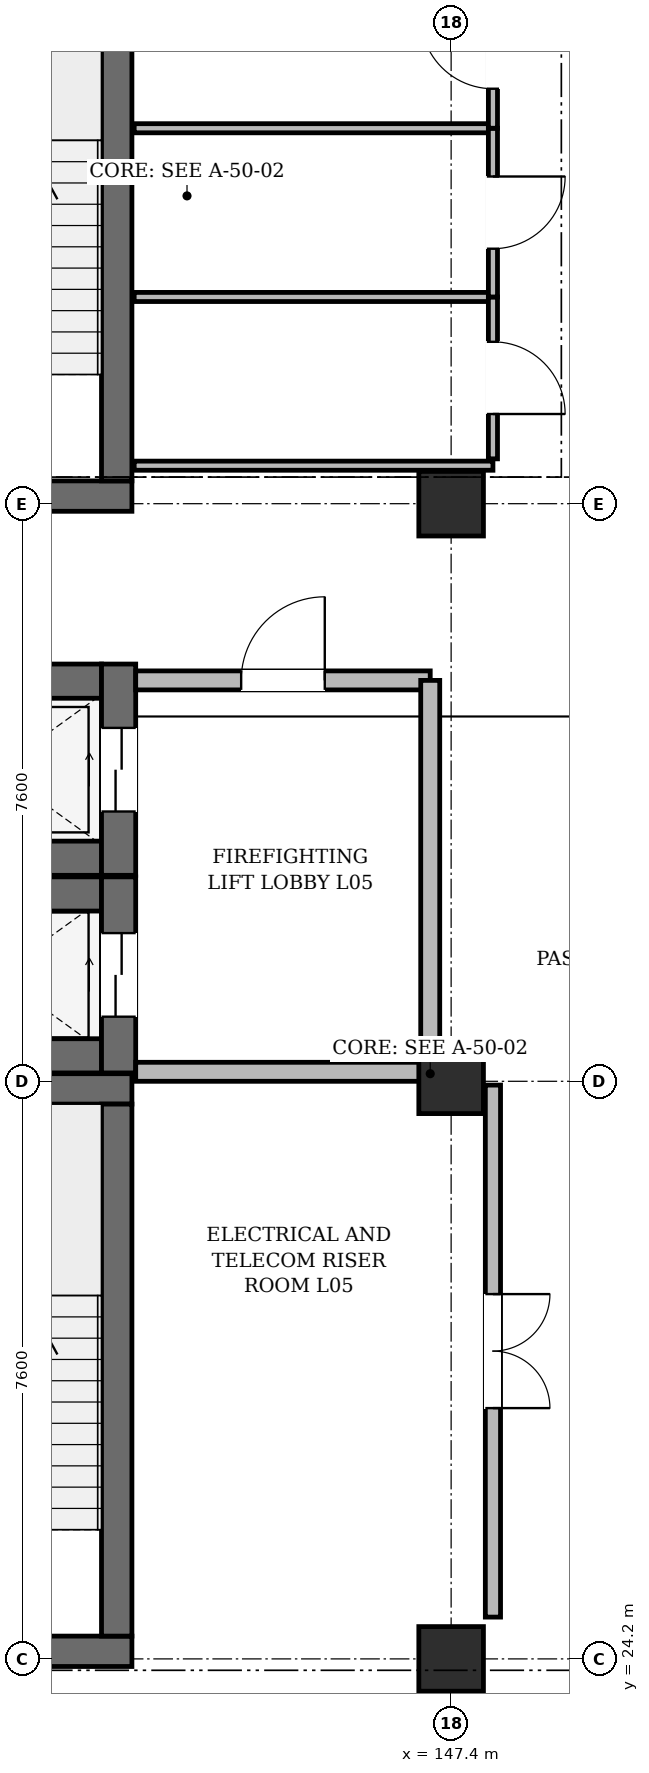
"""IFC4 building model, lengths in metres.
Left out: names, types, materials, properties, quantities, classifications, styles, units other than length and angle.
Written with IfcOpenShell. Run it as: python <this file> out.ifc"""

import sys

from ifc_helpers import new_model, si_unit, direction, frame, frame_2d, origin, origin_2d, place, context, subcontext, project, spatial, rectangle, extrude, element, fill, save


model = new_model("IFC4")
c1 = context("Model", 3, precision=1e-05, world=origin(), true_north=direction((0.0, 1.0)))
c2 = subcontext(c1, "Body", "Model", "MODEL_VIEW")
j1 = project(units=[si_unit("LENGTHUNIT", "METRE"), si_unit("PLANEANGLEUNIT", "RADIAN")], contexts=[c1])
p1 = place(None, origin())
s1 = spatial("IfcSite", under=j1, at=p1, CompositionType="ELEMENT")
p2 = place(p1, origin())
s2 = spatial("IfcBuilding", under=s1, at=p2, CompositionType="ELEMENT")
p3 = place(p2, frame((0.0, 0.0, 24.0)))
s3 = spatial("IfcBuildingStorey", under=s2, at=p3, CompositionType="ELEMENT", Elevation=24.0)
for number, where, z_axis, x_axis in (
    (1, (147.4, 24.2, 0.0), (0.0, 0.0, 1.0), (1.0, 0.0, 0.0)),
    (2, (147.4, 31.8, 0.0), (0.0, 0.0, 1.0), (1.0, 0.0, 0.0)),
    (3, (147.4, 39.4, 0.0), (0.0, 0.0, 1.0), (1.0, 0.0, 0.0)),
):
    element("IfcColumn", number, at=place(p3, frame(where, z_axis=z_axis, x_axis=x_axis)), inside=s3, PredefinedType="COLUMN", context=c2, shape_type="SweptSolid", body=[
        extrude(rectangle(XDim=0.85, YDim=0.85, at=origin_2d()), origin(), (0.0, 0.0, 1.0), 3.93),
    ])
p4 = place(p3, frame((139.4, 24.3, 0.0), z_axis=(0.0, 0.0, 1.0), x_axis=(1.0, 0.0, 0.0)))
e4 = element("IfcWall", 4, at=p4, inside=s3, PredefinedType="SHEAR", context=c2, shape_type="SweptSolid", body=[
    extrude(rectangle(XDim=3.8, YDim=0.4, at=frame_2d((1.9, 0.0))), origin(), (0.0, 0.0, 1.0), 3.93),
])
p5 = place(p4, frame((1.3, 0.0, 0.0)))
e5 = element("IfcOpeningElement", 5, at=p5, cuts=e4, PredefinedType="OPENING", context=c2, shape_type="SweptSolid", body=[
    extrude(rectangle(XDim=1.2, YDim=2.2, at=frame_2d((0.6, 1.1))), frame((0.0, 0.212, 0.0), z_axis=(0.0, -1.0, 0.0), x_axis=(1.0, 0.0, 0.0)), (0.0, 0.0, 1.0), 0.424),
])
p6 = place(p3, frame((139.4, 31.7, 0.0), z_axis=(0.0, 0.0, 1.0), x_axis=(1.0, 0.0, 0.0)))
e6 = element("IfcWall", 6, at=p6, inside=s3, PredefinedType="SHEAR", context=c2, shape_type="SweptSolid", body=[
    extrude(rectangle(XDim=3.8, YDim=0.4, at=frame_2d((1.9, 0.0))), origin(), (0.0, 0.0, 1.0), 3.93),
])
p7 = place(p3, frame((143.0, 24.5, 0.0), z_axis=(0.0, 0.0, 1.0), x_axis=(0.0, 1.0, 0.0)))
e7 = element("IfcWall", 7, at=p7, inside=s3, PredefinedType="SHEAR", context=c2, shape_type="SweptSolid", body=[
    extrude(rectangle(XDim=7.0, YDim=0.4, at=frame_2d((3.5, 0.0))), origin(), (0.0, 0.0, 1.0), 3.93),
])
p8 = place(p3, frame((139.4, 39.5, 0.0), z_axis=(0.0, 0.0, 1.0), x_axis=(1.0, 0.0, 0.0)))
e8 = element("IfcWall", 8, at=p8, inside=s3, PredefinedType="SHEAR", context=c2, shape_type="SweptSolid", body=[
    extrude(rectangle(XDim=3.8, YDim=0.4, at=frame_2d((1.9, 0.0))), origin(), (0.0, 0.0, 1.0), 3.93),
])
p9 = place(p8, frame((1.3, 0.0, 0.0)))
e9 = element("IfcOpeningElement", 9, at=p9, cuts=e8, PredefinedType="OPENING", context=c2, shape_type="SweptSolid", body=[
    extrude(rectangle(XDim=1.2, YDim=2.2, at=frame_2d((0.6, 1.1))), frame((0.0, 0.212, 0.0), z_axis=(0.0, -1.0, 0.0), x_axis=(1.0, 0.0, 0.0)), (0.0, 0.0, 1.0), 0.424),
])
p10 = place(p3, frame((143.0, 39.7, 0.0), z_axis=(0.0, 0.0, 1.0), x_axis=(0.0, 1.0, 0.0)))
e10 = element("IfcWall", 10, at=p10, inside=s3, PredefinedType="SHEAR", context=c2, shape_type="SweptSolid", body=[
    extrude(rectangle(XDim=7.0, YDim=0.4, at=frame_2d((3.5, 0.0))), origin(), (0.0, 0.0, 1.0), 3.93),
])
for number, where, z_axis, x_axis in (
    (11, (140.06, 32.135, 0.0), (0.0, 0.0, 1.0), (1.0, 0.0, 0.0)),
    (12, (140.06, 34.265, 0.0), (0.0, 0.0, 1.0), (1.0, 0.0, 0.0)),
):
    element("IfcWall", number, at=place(p3, frame(where, z_axis=z_axis, x_axis=x_axis)), inside=s3, PredefinedType="SHEAR", context=c2, shape_type="SweptSolid", body=[
        extrude(rectangle(XDim=2.74, YDim=0.45, at=frame_2d((1.37, 0.0))), origin(), (0.0, 0.0, 1.0), 3.93),
    ])
p11 = place(p3, frame((143.025, 31.91, 0.0), z_axis=(0.0, 0.0, 1.0), x_axis=(0.0, 1.0, 0.0)))
e13 = element("IfcWall", 13, at=p11, inside=s3, PredefinedType="SHEAR", context=c2, shape_type="SweptSolid", body=[
    extrude(rectangle(XDim=2.58, YDim=0.45, at=frame_2d((1.29, 0.0))), origin(), (0.0, 0.0, 1.0), 3.93),
])
p12 = place(p11, frame((0.74, 0.0, 0.0)))
e14 = element("IfcOpeningElement", 14, at=p12, cuts=e13, PredefinedType="OPENING", context=c2, shape_type="SweptSolid", body=[
    extrude(rectangle(XDim=1.1, YDim=2.2, at=frame_2d((0.55, 1.1))), frame((0.0, 0.237, 0.0), z_axis=(0.0, -1.0, 0.0), x_axis=(1.0, 0.0, 0.0)), (0.0, 0.0, 1.0), 0.474),
])
for number, where, z_axis, x_axis in (
    (15, (140.06, 34.735, 0.0), (0.0, 0.0, 1.0), (1.0, 0.0, 0.0)),
    (16, (140.06, 37.065, 0.0), (0.0, 0.0, 1.0), (1.0, 0.0, 0.0)),
):
    element("IfcWall", number, at=place(p3, frame(where, z_axis=z_axis, x_axis=x_axis)), inside=s3, PredefinedType="SHEAR", context=c2, shape_type="SweptSolid", body=[
        extrude(rectangle(XDim=2.74, YDim=0.45, at=frame_2d((1.37, 0.0))), origin(), (0.0, 0.0, 1.0), 3.93),
    ])
p13 = place(p3, frame((143.025, 34.51, 0.0), z_axis=(0.0, 0.0, 1.0), x_axis=(0.0, 1.0, 0.0)))
e17 = element("IfcWall", 17, at=p13, inside=s3, PredefinedType="SHEAR", context=c2, shape_type="SweptSolid", body=[
    extrude(rectangle(XDim=2.78, YDim=0.45, at=frame_2d((1.39, 0.0))), origin(), (0.0, 0.0, 1.0), 3.93),
])
p14 = place(p13, frame((0.84, 0.0, 0.0)))
e18 = element("IfcOpeningElement", 18, at=p14, cuts=e17, PredefinedType="OPENING", context=c2, shape_type="SweptSolid", body=[
    extrude(rectangle(XDim=1.1, YDim=2.2, at=frame_2d((0.55, 1.1))), frame((0.0, 0.237, 0.0), z_axis=(0.0, -1.0, 0.0), x_axis=(1.0, 0.0, 0.0)), (0.0, 0.0, 1.0), 0.474),
])
p15 = place(p3, frame((143.25, 37.075, 0.0), z_axis=(0.0, 0.0, 1.0), x_axis=(1.0, 0.0, 0.0)))
e19 = element("IfcWall", 19, at=p15, inside=s3, PredefinedType="SOLIDWALL", context=c2, shape_type="SweptSolid", body=[
    extrude(rectangle(XDim=3.875, YDim=0.25, at=frame_2d((1.938, 0.0))), origin(), (0.0, 0.0, 1.0), 3.805),
])
p16 = place(p15, frame((1.387, 0.0, 0.0)))
e20 = element("IfcOpeningElement", 20, at=p16, cuts=e19, PredefinedType="OPENING", context=c2, shape_type="SweptSolid", body=[
    extrude(rectangle(XDim=1.1, YDim=2.2, at=frame_2d((0.55, 1.1))), frame((0.0, 0.137, 0.0), z_axis=(0.0, -1.0, 0.0), x_axis=(1.0, 0.0, 0.0)), (0.0, 0.0, 1.0), 0.274),
])
p17 = place(p3, frame((143.25, 31.925, 0.0), z_axis=(0.0, 0.0, 1.0), x_axis=(1.0, 0.0, 0.0)))
e21 = element("IfcWall", 21, at=p17, inside=s3, PredefinedType="SOLIDWALL", context=c2, shape_type="SweptSolid", body=[
    extrude(rectangle(XDim=3.875, YDim=0.25, at=frame_2d((1.938, 0.0))), origin(), (0.0, 0.0, 1.0), 3.265),
])
p18 = place(p3, frame((147.125, 31.925, 0.0), z_axis=(0.0, 0.0, 1.0), x_axis=(0.0, 1.0, 0.0)))
e22 = element("IfcWall", 22, at=p18, inside=s3, PredefinedType="SOLIDWALL", context=c2, shape_type="SweptSolid", body=[
    extrude(rectangle(XDim=5.15, YDim=0.25, at=frame_2d((2.575, 0.0))), origin(), (0.0, 0.0, 1.0), 3.265),
])
p19 = place(p3, frame((143.23, 39.9, 0.0), z_axis=(0.0, 0.0, 1.0), x_axis=(1.0, 0.0, 0.0)))
e23 = element("IfcWall", 23, at=p19, inside=s3, PredefinedType="PARTITIONING", context=c2, shape_type="SweptSolid", body=[
    extrude(rectangle(XDim=4.72, YDim=0.12, at=frame_2d((2.36, 0.0))), origin(), (0.0, 0.0, 1.0), 3.805),
])
p20 = place(p3, frame((147.95, 31.75, 0.0), z_axis=(0.0, 0.0, 1.0), x_axis=(0.0, -1.0, 0.0)))
e24 = element("IfcWall", 24, at=p20, inside=s3, PredefinedType="PARTITIONING", context=c2, shape_type="SweptSolid", body=[
    extrude(rectangle(XDim=7.0, YDim=0.2, at=frame_2d((3.5, 0.0))), origin(), (0.0, 0.0, 1.0), 3.805),
])
p21 = place(p20, frame((2.75, 0.0, 0.0)))
e25 = element("IfcOpeningElement", 25, at=p21, cuts=e24, PredefinedType="OPENING", context=c2, shape_type="SweptSolid", body=[
    extrude(rectangle(XDim=1.5, YDim=2.2, at=frame_2d((0.75, 1.1))), frame((0.0, 0.112, 0.0), z_axis=(0.0, -1.0, 0.0), x_axis=(1.0, 0.0, 0.0)), (0.0, 0.0, 1.0), 0.224),
])
p22 = place(p3, frame((143.23, 42.12, 0.0), z_axis=(0.0, 0.0, 1.0), x_axis=(1.0, 0.0, 0.0)))
e26 = element("IfcWall", 26, at=p22, inside=s3, PredefinedType="PARTITIONING", context=c2, shape_type="SweptSolid", body=[
    extrude(rectangle(XDim=4.72, YDim=0.12, at=frame_2d((2.36, 0.0))), origin(), (0.0, 0.0, 1.0), 3.405),
])
p23 = place(p3, frame((147.95, 42.12, 0.0), z_axis=(0.0, 0.0, 1.0), x_axis=(0.0, -1.0, 0.0)))
e27 = element("IfcWall", 27, at=p23, inside=s3, PredefinedType="PARTITIONING", context=c2, shape_type="SweptSolid", body=[
    extrude(rectangle(XDim=2.13, YDim=0.12, at=frame_2d((1.065, 0.0))), origin(), (0.0, 0.0, 1.0), 3.805),
])
p24 = place(p23, frame((0.59, 0.0, 0.0)))
e28 = element("IfcOpeningElement", 28, at=p24, cuts=e27, PredefinedType="OPENING", context=c2, shape_type="SweptSolid", body=[
    extrude(rectangle(XDim=0.95, YDim=2.15, at=frame_2d((0.475, 1.075))), frame((0.0, 0.072, 0.0), z_axis=(0.0, -1.0, 0.0), x_axis=(1.0, 0.0, 0.0)), (0.0, 0.0, 1.0), 0.144),
])
p25 = place(p3, frame((143.23, 44.34, 0.0), z_axis=(0.0, 0.0, 1.0), x_axis=(1.0, 0.0, 0.0)))
e29 = element("IfcWall", 29, at=p25, inside=s3, PredefinedType="PARTITIONING", context=c2, shape_type="SweptSolid", body=[
    extrude(rectangle(XDim=4.72, YDim=0.12, at=frame_2d((2.36, 0.0))), origin(), (0.0, 0.0, 1.0), 3.355),
])
p26 = place(p3, frame((147.95, 44.34, 0.0), z_axis=(0.0, 0.0, 1.0), x_axis=(0.0, -1.0, 0.0)))
e30 = element("IfcWall", 30, at=p26, inside=s3, PredefinedType="PARTITIONING", context=c2, shape_type="SweptSolid", body=[
    extrude(rectangle(XDim=2.22, YDim=0.12, at=frame_2d((1.11, 0.0))), origin(), (0.0, 0.0, 1.0), 3.805),
])
p27 = place(p26, frame((0.635, 0.0, 0.0)))
e31 = element("IfcOpeningElement", 31, at=p27, cuts=e30, PredefinedType="OPENING", context=c2, shape_type="SweptSolid", body=[
    extrude(rectangle(XDim=0.95, YDim=2.15, at=frame_2d((0.475, 1.075))), frame((0.0, 0.072, 0.0), z_axis=(0.0, -1.0, 0.0), x_axis=(1.0, 0.0, 0.0)), (0.0, 0.0, 1.0), 0.144),
])
p28 = place(p3, frame((147.95, 46.33, 0.0), z_axis=(0.0, 0.0, 1.0), x_axis=(0.0, -1.0, 0.0)))
e32 = element("IfcWall", 32, at=p28, inside=s3, PredefinedType="PARTITIONING", context=c2, shape_type="SweptSolid", body=[
    extrude(rectangle(XDim=1.99, YDim=0.12, at=frame_2d((0.995, 0.0))), origin(), (0.0, 0.0, 1.0), 3.805),
])
p29 = place(p28, frame((0.52, 0.0, 0.0)))
e33 = element("IfcOpeningElement", 33, at=p29, cuts=e32, PredefinedType="OPENING", context=c2, shape_type="SweptSolid", body=[
    extrude(rectangle(XDim=0.95, YDim=2.15, at=frame_2d((0.475, 1.075))), frame((0.0, 0.072, 0.0), z_axis=(0.0, -1.0, 0.0), x_axis=(1.0, 0.0, 0.0)), (0.0, 0.0, 1.0), 0.144),
])
p30 = place(p12, origin())
e34 = element("IfcDoor", 34, at=p30, inside=s3, OperationType="DOUBLE_DOOR_SLIDING", PredefinedType="DOOR", context=c2, shape_type="SweptSolid", body=[
    extrude(rectangle(XDim=1.1, YDim=2.2, at=frame_2d((0.55, 1.1))), frame((0.0, 0.025, 0.0), z_axis=(0.0, -1.0, 0.0), x_axis=(1.0, 0.0, 0.0)), (0.0, 0.0, 1.0), 0.05),
])
fill(e14, e34)
p31 = place(p14, origin())
e35 = element("IfcDoor", 35, at=p31, inside=s3, OperationType="DOUBLE_DOOR_SLIDING", PredefinedType="DOOR", context=c2, shape_type="SweptSolid", body=[
    extrude(rectangle(XDim=1.1, YDim=2.2, at=frame_2d((0.55, 1.1))), frame((0.0, 0.025, 0.0), z_axis=(0.0, -1.0, 0.0), x_axis=(1.0, 0.0, 0.0)), (0.0, 0.0, 1.0), 0.05),
])
fill(e18, e35)
p32 = place(p16, origin())
e36 = element("IfcDoor", 36, at=p32, inside=s3, OperationType="SINGLE_SWING_RIGHT", PredefinedType="DOOR", context=c2, shape_type="SweptSolid", body=[
    extrude(rectangle(XDim=1.1, YDim=2.2, at=frame_2d((0.55, 1.1))), frame((0.0, 0.025, 0.0), z_axis=(0.0, -1.0, 0.0), x_axis=(1.0, 0.0, 0.0)), (0.0, 0.0, 1.0), 0.05),
])
fill(e20, e36)
p33 = place(p21, origin())
e37 = element("IfcDoor", 37, at=p33, inside=s3, OperationType="DOUBLE_DOOR_SINGLE_SWING", PredefinedType="DOOR", context=c2, shape_type="SweptSolid", body=[
    extrude(rectangle(XDim=1.5, YDim=2.2, at=frame_2d((0.75, 1.1))), frame((0.0, 0.025, 0.0), z_axis=(0.0, -1.0, 0.0), x_axis=(1.0, 0.0, 0.0)), (0.0, 0.0, 1.0), 0.05),
])
fill(e25, e37)
p34 = place(p24, origin())
e38 = element("IfcDoor", 38, at=p34, inside=s3, OperationType="SINGLE_SWING_RIGHT", PredefinedType="DOOR", context=c2, shape_type="SweptSolid", body=[
    extrude(rectangle(XDim=0.95, YDim=2.15, at=frame_2d((0.475, 1.075))), frame((0.0, 0.025, 0.0), z_axis=(0.0, -1.0, 0.0), x_axis=(1.0, 0.0, 0.0)), (0.0, 0.0, 1.0), 0.05),
])
fill(e28, e38)
p35 = place(p27, origin())
e39 = element("IfcDoor", 39, at=p35, inside=s3, OperationType="SINGLE_SWING_LEFT", PredefinedType="DOOR", context=c2, shape_type="SweptSolid", body=[
    extrude(rectangle(XDim=0.95, YDim=2.15, at=frame_2d((0.475, 1.075))), frame((0.0, 0.025, 0.0), z_axis=(0.0, -1.0, 0.0), x_axis=(1.0, 0.0, 0.0)), (0.0, 0.0, 1.0), 0.05),
])
fill(e31, e39)
p36 = place(p29, frame((0.95, 0.0, 0.0), z_axis=(0.0, 0.0, 1.0), x_axis=(-1.0, 0.0, 0.0)))
e40 = element("IfcDoor", 40, at=p36, inside=s3, OperationType="SINGLE_SWING_RIGHT", PredefinedType="DOOR", context=c2, shape_type="SweptSolid", body=[
    extrude(rectangle(XDim=0.95, YDim=2.15, at=frame_2d((0.475, 1.075))), frame((0.0, 0.025, 0.0), z_axis=(0.0, -1.0, 0.0), x_axis=(1.0, 0.0, 0.0)), (0.0, 0.0, 1.0), 0.05),
])
fill(e33, e40)
save(model, sys.argv[1])
